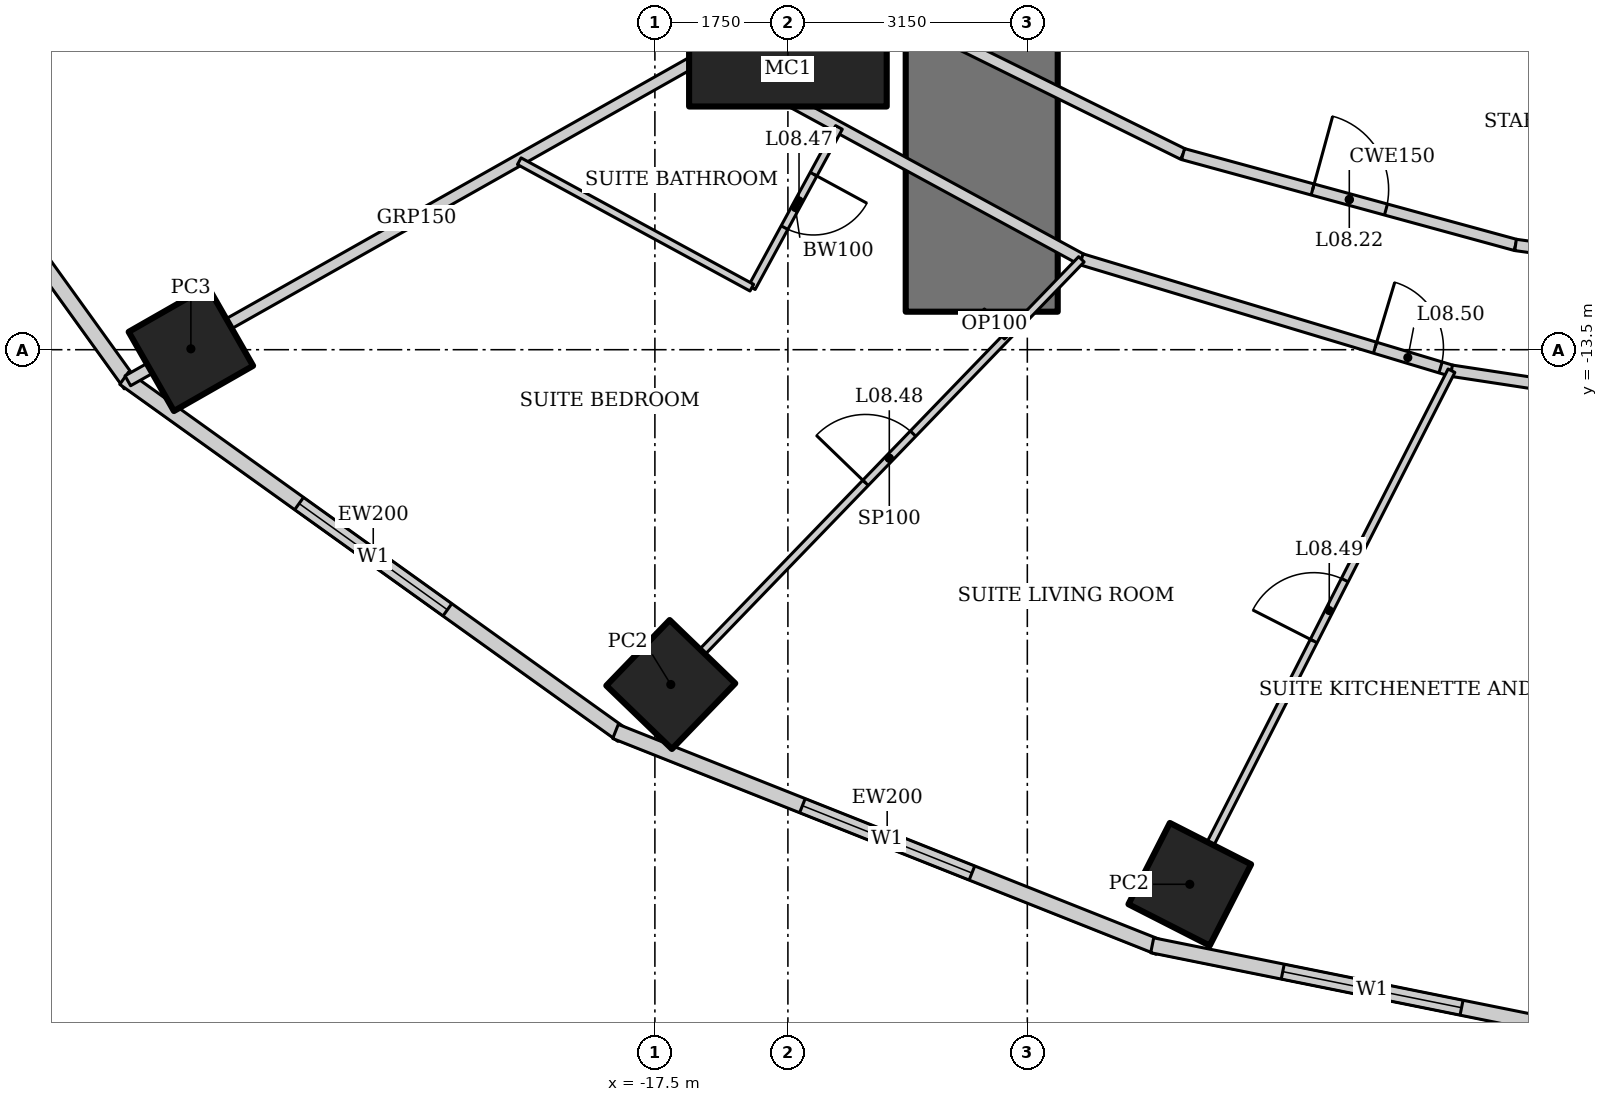
"""IFC4 building model, lengths in metres.
Left out: names, types, materials, properties, quantities, classifications, styles, units other than length and angle.
Written with IfcOpenShell. Run it as: python <this file> out.ifc"""

import sys

from ifc_helpers import new_model, si_unit, direction, frame, frame_2d, origin, origin_2d, place, context, subcontext, project, spatial, rectangle, hollow_rectangle, extrude, element, fill, save


model = new_model("IFC4")
c1 = context("Model", 3, precision=1e-05, world=origin(), true_north=direction((0.0, 1.0)))
c2 = subcontext(c1, "Body", "Model", "MODEL_VIEW")
j1 = project(units=[si_unit("LENGTHUNIT", "METRE"), si_unit("PLANEANGLEUNIT", "RADIAN")], contexts=[c1])
p1 = place(None, origin())
s1 = spatial("IfcSite", under=j1, at=p1, CompositionType="ELEMENT")
p2 = place(p1, origin())
s2 = spatial("IfcBuilding", under=s1, at=p2, CompositionType="ELEMENT")
p3 = place(p2, frame((0.0, 0.0, 44.2)))
s3 = spatial("IfcBuildingStorey", under=s2, at=p3, CompositionType="ELEMENT", Elevation=44.2)
p4 = place(p3, frame((-15.75, -9.0, 0.0), z_axis=(0.0, 0.0, 1.0), x_axis=(1.0, 0.0, 0.0)))
e1 = element("IfcColumn", 1, at=p4, inside=s3, PredefinedType="COLUMN", context=c2, shape_type="SweptSolid", body=[
    extrude(hollow_rectangle(XDim=2.6, YDim=2.6, WallThickness=0.13, at=origin_2d()), origin(), (0.0, 0.0, 1.0), 3.6),
])
p5 = place(p3, frame((-23.605, -13.489, 0.0), z_axis=(0.0, 0.0, 1.0), x_axis=(0.86824298017, 0.496139221777, 0.0)))
e2 = element("IfcColumn", 2, at=p5, inside=s3, PredefinedType="COLUMN", context=c2, shape_type="SweptSolid", body=[
    extrude(hollow_rectangle(XDim=1.2, YDim=1.2, WallThickness=0.12, at=origin_2d()), origin(), (0.0, 0.0, 1.0), 3.6),
])
for number, where, z_axis, x_axis in (
    (3, (-17.291, -17.905, 0.0), (0.0, 0.0, 1.0), (0.695, 0.719, 0.0)),
    (4, (-10.463, -20.534, 0.0), (0.0, 0.0, 1.0), (0.454, 0.891, 0.0)),
):
    element("IfcColumn", number, at=place(p3, frame(where, z_axis=z_axis, x_axis=x_axis)), inside=s3, PredefinedType="COLUMN", context=c2, shape_type="SweptSolid", body=[
        extrude(hollow_rectangle(XDim=1.2, YDim=1.2, WallThickness=0.1, at=origin_2d()), origin(), (0.0, 0.0, 1.0), 3.6),
    ])
p6 = place(p3, frame((-13.2, 13.0, 0.0), z_axis=(0.0, 0.0, 1.0), x_axis=(0.0, -1.0, 0.0)))
e5 = element("IfcWall", 5, at=p6, inside=s3, PredefinedType="SHEAR", context=c2, shape_type="SweptSolid", body=[
    extrude(rectangle(XDim=26.0, YDim=2.0, at=frame_2d((13.0, 0.0))), origin(), (0.0, 0.0, 1.0), 3.6),
])
p7 = place(p6, frame((12.1, 0.0, 0.0)))
e6 = element("IfcOpeningElement", 6, at=p7, cuts=e5, PredefinedType="OPENING", context=c2, shape_type="SweptSolid", body=[
    extrude(rectangle(XDim=1.8, YDim=2.1, at=frame_2d((0.9, 1.05))), frame((0.0, 1.01, 0.0), z_axis=(0.0, -1.0, 0.0), x_axis=(1.0, 0.0, 0.0)), (0.0, 0.0, 1.0), 2.02),
])
p8 = place(p3, frame((-29.26, -7.2, 0.0), z_axis=(0.0, 0.0, 1.0), x_axis=(0.583937613703, -0.811798536155, 0.0)))
e7 = element("IfcWall", 7, at=p8, inside=s3, PredefinedType="SOLIDWALL", context=c2, shape_type="SweptSolid", body=[
    extrude(rectangle(XDim=8.323, YDim=0.2, at=frame_2d((4.162, 0.0))), origin(), (0.0, 0.0, 1.0), 3.45),
])
p9 = place(p8, frame((2.961, 0.0, 0.5)))
e8 = element("IfcOpeningElement", 8, at=p9, cuts=e7, PredefinedType="OPENING", context=c2, shape_type="SweptSolid", body=[
    extrude(rectangle(XDim=2.4, YDim=2.2, at=frame_2d((1.2, 1.1))), frame((0.0, 0.11, 0.0), z_axis=(0.0, -1.0, 0.0), x_axis=(1.0, 0.0, 0.0)), (0.0, 0.0, 1.0), 0.22),
])
p10 = place(p3, frame((-24.482, -13.875, 0.0), z_axis=(0.0, 0.0, 1.0), x_axis=(0.812791321576, -0.582554948112, 0.0)))
e9 = element("IfcWall", 9, at=p10, inside=s3, PredefinedType="SOLIDWALL", context=c2, shape_type="SweptSolid", body=[
    extrude(rectangle(XDim=8.063, YDim=0.2, at=frame_2d((4.032, 0.0))), origin(), (0.0, 0.0, 1.0), 3.45),
])
p11 = place(p10, frame((2.832, 0.0, 0.5)))
e10 = element("IfcOpeningElement", 10, at=p11, cuts=e9, PredefinedType="OPENING", context=c2, shape_type="SweptSolid", body=[
    extrude(rectangle(XDim=2.4, YDim=2.2, at=frame_2d((1.2, 1.1))), frame((0.0, 0.11, 0.0), z_axis=(0.0, -1.0, 0.0), x_axis=(1.0, 0.0, 0.0)), (0.0, 0.0, 1.0), 0.22),
])
p12 = place(p3, frame((-18.018, -18.523, 0.0), z_axis=(0.0, 0.0, 1.0), x_axis=(0.929358351251, -0.369178892895, 0.0)))
e11 = element("IfcWall", 11, at=p12, inside=s3, PredefinedType="SOLIDWALL", context=c2, shape_type="SweptSolid", body=[
    extrude(rectangle(XDim=7.692, YDim=0.2, at=frame_2d((3.846, 0.0))), origin(), (0.0, 0.0, 1.0), 3.45),
])
p13 = place(p12, frame((2.646, 0.0, 0.5)))
e12 = element("IfcOpeningElement", 12, at=p13, cuts=e11, PredefinedType="OPENING", context=c2, shape_type="SweptSolid", body=[
    extrude(rectangle(XDim=2.4, YDim=2.2, at=frame_2d((1.2, 1.1))), frame((0.0, 0.11, 0.0), z_axis=(0.0, -1.0, 0.0), x_axis=(1.0, 0.0, 0.0)), (0.0, 0.0, 1.0), 0.22),
])
p14 = place(p3, frame((-10.957, -21.337, 0.0), z_axis=(0.0, 0.0, 1.0), x_axis=(0.980251657452, -0.197754110105, 0.0)))
e13 = element("IfcWall", 13, at=p14, inside=s3, PredefinedType="SOLIDWALL", context=c2, shape_type="SweptSolid", body=[
    extrude(rectangle(XDim=5.904, YDim=0.2, at=frame_2d((2.952, 0.0))), origin(), (0.0, 0.0, 1.0), 3.45),
])
p15 = place(p14, frame((1.752, 0.0, 0.5)))
e14 = element("IfcOpeningElement", 14, at=p15, cuts=e13, PredefinedType="OPENING", context=c2, shape_type="SweptSolid", body=[
    extrude(rectangle(XDim=2.4, YDim=2.2, at=frame_2d((1.2, 1.1))), frame((0.0, 0.11, 0.0), z_axis=(0.0, -1.0, 0.0), x_axis=(1.0, 0.0, 0.0)), (0.0, 0.0, 1.0), 0.22),
])
p16 = place(p3, frame((-24.435, -13.909, 0.0), z_axis=(0.0, 0.0, 1.0), x_axis=(0.87090601027, 0.491449612143, 0.0)))
e15 = element("IfcWall", 15, at=p16, inside=s3, PredefinedType="PARTITIONING", context=c2, shape_type="SweptSolid", body=[
    extrude(rectangle(XDim=8.726, YDim=0.15, at=frame_2d((4.363, 0.0))), origin(), (0.0, 0.0, 1.0), 2.693),
])
p17 = place(p3, frame((-20.984, -5.232, 0.0), z_axis=(0.0, 0.0, 1.0), x_axis=(0.687062608696, -0.726598218916, 0.0)))
e16 = element("IfcWall", 16, at=p17, inside=s3, PredefinedType="PARTITIONING", context=c2, shape_type="SweptSolid", body=[
    extrude(rectangle(XDim=6.039, YDim=0.15, at=frame_2d((3.02, 0.0))), origin(), (0.0, 0.0, 1.0), 3.45),
])
p18 = place(p17, frame((2.1, 0.0, 0.0)))
e17 = element("IfcOpeningElement", 17, at=p18, cuts=e16, PredefinedType="OPENING", context=c2, shape_type="SweptSolid", body=[
    extrude(rectangle(XDim=0.9, YDim=2.1, at=frame_2d((0.45, 1.05))), frame((0.0, 0.085, 0.0), z_axis=(0.0, -1.0, 0.0), x_axis=(1.0, 0.0, 0.0)), (0.0, 0.0, 1.0), 0.17),
])
p19 = place(p3, frame((-16.835, -9.62, 0.0), z_axis=(0.0, 0.0, 1.0), x_axis=(0.878450059298, -0.477834169267, 0.0)))
e18 = element("IfcWall", 18, at=p19, inside=s3, PredefinedType="PARTITIONING", context=c2, shape_type="SweptSolid", body=[
    extrude(rectangle(XDim=5.631, YDim=0.15, at=frame_2d((2.815, 0.0))), origin(), (0.0, 0.0, 1.0), 3.45),
])
p20 = place(p3, frame((-11.888, -12.311, 0.0), z_axis=(0.0, 0.0, 1.0), x_axis=(0.957564241242, -0.288219922793, 0.0)))
e19 = element("IfcWall", 19, at=p20, inside=s3, PredefinedType="PARTITIONING", context=c2, shape_type="SweptSolid", body=[
    extrude(rectangle(XDim=5.085, YDim=0.15, at=frame_2d((2.542, 0.0))), origin(), (0.0, 0.0, 1.0), 3.45),
])
p21 = place(p20, frame((4.035, 0.0, 0.0)))
e20 = element("IfcOpeningElement", 20, at=p21, cuts=e19, PredefinedType="OPENING", context=c2, shape_type="SweptSolid", body=[
    extrude(rectangle(XDim=0.9, YDim=2.1, at=frame_2d((0.45, 1.05))), frame((0.0, 0.085, 0.0), z_axis=(0.0, -1.0, 0.0), x_axis=(1.0, 0.0, 0.0)), (0.0, 0.0, 1.0), 0.17),
])
p22 = place(p3, frame((-7.019, -13.776, 0.0), z_axis=(0.0, 0.0, 1.0), x_axis=(0.988564270062, -0.150800145746, 0.0)))
e21 = element("IfcWall", 21, at=p22, inside=s3, PredefinedType="PARTITIONING", context=c2, shape_type="SweptSolid", body=[
    extrude(rectangle(XDim=3.751, YDim=0.15, at=frame_2d((1.875, 0.0))), origin(), (0.0, 0.0, 1.0), 3.45),
])
p23 = place(p3, frame((-15.147, -8.656, 0.0), z_axis=(0.0, 0.0, 1.0), x_axis=(0.89656943448, -0.442903205177, 0.0)))
e22 = element("IfcWall", 22, at=p23, inside=s3, PredefinedType="PARTITIONING", context=c2, shape_type="SweptSolid", body=[
    extrude(rectangle(XDim=5.126, YDim=0.15, at=frame_2d((2.563, 0.0))), origin(), (0.0, 0.0, 1.0), 3.45),
])
p24 = place(p3, frame((-10.551, -10.926, 0.0), z_axis=(0.0, 0.0, 1.0), x_axis=(0.964644466646, -0.263554648923, 0.0)))
e23 = element("IfcWall", 23, at=p24, inside=s3, PredefinedType="PARTITIONING", context=c2, shape_type="SweptSolid", body=[
    extrude(rectangle(XDim=4.535, YDim=0.15, at=frame_2d((2.268, 0.0))), origin(), (0.0, 0.0, 1.0), 3.45),
])
p25 = place(p24, frame((1.768, 0.0, 0.0)))
e24 = element("IfcOpeningElement", 24, at=p25, cuts=e23, PredefinedType="OPENING", context=c2, shape_type="SweptSolid", body=[
    extrude(rectangle(XDim=1.0, YDim=2.1, at=frame_2d((0.5, 1.05))), frame((0.0, 0.085, 0.0), z_axis=(0.0, -1.0, 0.0), x_axis=(1.0, 0.0, 0.0)), (0.0, 0.0, 1.0), 0.17),
])
p26 = place(p3, frame((-6.176, -12.122, 0.0), z_axis=(0.0, 0.0, 1.0), x_axis=(0.990563451353, -0.137054911782, 0.0)))
e25 = element("IfcWall", 25, at=p26, inside=s3, PredefinedType="PARTITIONING", context=c2, shape_type="SweptSolid", body=[
    extrude(rectangle(XDim=3.304, YDim=0.15, at=frame_2d((1.652, 0.0))), origin(), (0.0, 0.0, 1.0), 3.45),
])
p27 = place(p3, frame((-15.078, -10.576, 0.0), z_axis=(0.0, 0.0, 1.0), x_axis=(-0.477832549678, -0.878450940274, 0.0)))
e26 = element("IfcWall", 26, at=p27, inside=s3, PredefinedType="PARTITIONING", context=c2, shape_type="SweptSolid", body=[
    extrude(rectangle(XDim=2.4, YDim=0.1, at=frame_2d((1.2, 0.0))), origin(), (0.0, 0.0, 1.0), 3.45),
])
p28 = place(p27, frame((0.7, 0.0, 0.0)))
e27 = element("IfcOpeningElement", 27, at=p28, cuts=e26, PredefinedType="OPENING", context=c2, shape_type="SweptSolid", body=[
    extrude(rectangle(XDim=0.8, YDim=2.1, at=frame_2d((0.4, 1.05))), frame((0.0, 0.06, 0.0), z_axis=(0.0, -1.0, 0.0), x_axis=(1.0, 0.0, 0.0)), (0.0, 0.0, 1.0), 0.12),
])
p29 = place(p3, frame((-16.225, -12.684, 0.0), z_axis=(0.0, 0.0, 1.0), x_axis=(-0.878473578893, 0.477790928322, 0.0)))
e28 = element("IfcWall", 28, at=p29, inside=s3, PredefinedType="PARTITIONING", context=c2, shape_type="SweptSolid", body=[
    extrude(rectangle(XDim=3.483, YDim=0.1, at=frame_2d((1.741, 0.0))), origin(), (0.0, 0.0, 1.0), 3.45),
])
p30 = place(p3, frame((-16.944, -17.545, 0.0), z_axis=(0.0, 0.0, 1.0), x_axis=(0.694669949151, 0.719328618746, 0.0)))
e29 = element("IfcWall", 29, at=p30, inside=s3, PredefinedType="PARTITIONING", context=c2, shape_type="SweptSolid", body=[
    extrude(rectangle(XDim=7.277, YDim=0.1, at=frame_2d((3.639, 0.0))), origin(), (0.0, 0.0, 1.0), 2.528),
])
p31 = place(p30, frame((3.189, 0.0, 0.0)))
e30 = element("IfcOpeningElement", 30, at=p31, cuts=e29, PredefinedType="OPENING", context=c2, shape_type="SweptSolid", body=[
    extrude(rectangle(XDim=0.9, YDim=2.1, at=frame_2d((0.45, 1.05))), frame((0.0, 0.06, 0.0), z_axis=(0.0, -1.0, 0.0), x_axis=(1.0, 0.0, 0.0)), (0.0, 0.0, 1.0), 0.12),
])
p32 = place(p3, frame((-10.236, -20.088, 0.0), z_axis=(0.0, 0.0, 1.0), x_axis=(0.454010445571, 0.890996360998, 0.0)))
e31 = element("IfcWall", 31, at=p32, inside=s3, PredefinedType="PARTITIONING", context=c2, shape_type="SweptSolid", body=[
    extrude(rectangle(XDim=7.084, YDim=0.1, at=frame_2d((3.542, 0.0))), origin(), (0.0, 0.0, 1.0), 2.528),
])
p33 = place(p32, frame((3.092, 0.0, 0.0)))
e32 = element("IfcOpeningElement", 32, at=p33, cuts=e31, PredefinedType="OPENING", context=c2, shape_type="SweptSolid", body=[
    extrude(rectangle(XDim=0.9, YDim=2.1, at=frame_2d((0.45, 1.05))), frame((0.0, 0.06, 0.0), z_axis=(0.0, -1.0, 0.0), x_axis=(1.0, 0.0, 0.0)), (0.0, 0.0, 1.0), 0.12),
])
p34 = place(p3, frame((-13.2, -13.0, 0.0), z_axis=(0.0, 0.0, 1.0), x_axis=(0.719347134512, -0.69465077562, 0.0)))
e33 = element("IfcWall", 33, at=p34, inside=s3, PredefinedType="PARTITIONING", context=c2, shape_type="SweptSolid", body=[
    extrude(rectangle(XDim=0.465, YDim=0.1, at=frame_2d((0.232, 0.0))), origin(), (0.0, 0.0, 1.0), 3.45),
])
p35 = place(p11, origin())
e34 = element("IfcWindow", 34, at=p35, inside=s3, PartitioningType="SINGLE_PANEL", PredefinedType="WINDOW", context=c2, shape_type="SweptSolid", body=[
    extrude(rectangle(XDim=2.4, YDim=2.2, at=frame_2d((1.2, 1.1))), frame((0.0, 0.03, 0.0), z_axis=(0.0, -1.0, 0.0), x_axis=(1.0, 0.0, 0.0)), (0.0, 0.0, 1.0), 0.06),
])
fill(e10, e34)
p36 = place(p13, origin())
e35 = element("IfcWindow", 35, at=p36, inside=s3, PartitioningType="SINGLE_PANEL", PredefinedType="WINDOW", context=c2, shape_type="SweptSolid", body=[
    extrude(rectangle(XDim=2.4, YDim=2.2, at=frame_2d((1.2, 1.1))), frame((0.0, 0.03, 0.0), z_axis=(0.0, -1.0, 0.0), x_axis=(1.0, 0.0, 0.0)), (0.0, 0.0, 1.0), 0.06),
])
fill(e12, e35)
p37 = place(p15, origin())
e36 = element("IfcWindow", 36, at=p37, inside=s3, PartitioningType="SINGLE_PANEL", PredefinedType="WINDOW", context=c2, shape_type="SweptSolid", body=[
    extrude(rectangle(XDim=2.4, YDim=2.2, at=frame_2d((1.2, 1.1))), frame((0.0, 0.03, 0.0), z_axis=(0.0, -1.0, 0.0), x_axis=(1.0, 0.0, 0.0)), (0.0, 0.0, 1.0), 0.06),
])
fill(e14, e36)
p38 = place(p25, origin())
e37 = element("IfcDoor", 37, at=p38, inside=s3, OperationType="SINGLE_SWING_LEFT", PredefinedType="DOOR", context=c2, shape_type="SweptSolid", body=[
    extrude(rectangle(XDim=1.0, YDim=2.1, at=frame_2d((0.5, 1.05))), frame((0.0, 0.025, 0.0), z_axis=(0.0, -1.0, 0.0), x_axis=(1.0, 0.0, 0.0)), (0.0, 0.0, 1.0), 0.05),
])
fill(e24, e37)
p39 = place(p28, origin())
e38 = element("IfcDoor", 38, at=p39, inside=s3, OperationType="SINGLE_SWING_LEFT", PredefinedType="DOOR", context=c2, shape_type="SweptSolid", body=[
    extrude(rectangle(XDim=0.8, YDim=2.1, at=frame_2d((0.4, 1.05))), frame((0.0, 0.025, 0.0), z_axis=(0.0, -1.0, 0.0), x_axis=(1.0, 0.0, 0.0)), (0.0, 0.0, 1.0), 0.05),
])
fill(e27, e38)
p40 = place(p31, origin())
e39 = element("IfcDoor", 39, at=p40, inside=s3, OperationType="SINGLE_SWING_LEFT", PredefinedType="DOOR", context=c2, shape_type="SweptSolid", body=[
    extrude(rectangle(XDim=0.9, YDim=2.1, at=frame_2d((0.45, 1.05))), frame((0.0, 0.025, 0.0), z_axis=(0.0, -1.0, 0.0), x_axis=(1.0, 0.0, 0.0)), (0.0, 0.0, 1.0), 0.05),
])
fill(e30, e39)
p41 = place(p33, origin())
e40 = element("IfcDoor", 40, at=p41, inside=s3, OperationType="SINGLE_SWING_LEFT", PredefinedType="DOOR", context=c2, shape_type="SweptSolid", body=[
    extrude(rectangle(XDim=0.9, YDim=2.1, at=frame_2d((0.45, 1.05))), frame((0.0, 0.025, 0.0), z_axis=(0.0, -1.0, 0.0), x_axis=(1.0, 0.0, 0.0)), (0.0, 0.0, 1.0), 0.05),
])
fill(e32, e40)
p42 = place(p21, origin())
e41 = element("IfcDoor", 41, at=p42, inside=s3, OperationType="SINGLE_SWING_LEFT", PredefinedType="DOOR", context=c2, shape_type="SweptSolid", body=[
    extrude(rectangle(XDim=0.9, YDim=2.1, at=frame_2d((0.45, 1.05))), frame((0.0, 0.025, 0.0), z_axis=(0.0, -1.0, 0.0), x_axis=(1.0, 0.0, 0.0)), (0.0, 0.0, 1.0), 0.05),
])
fill(e20, e41)
save(model, sys.argv[1])
